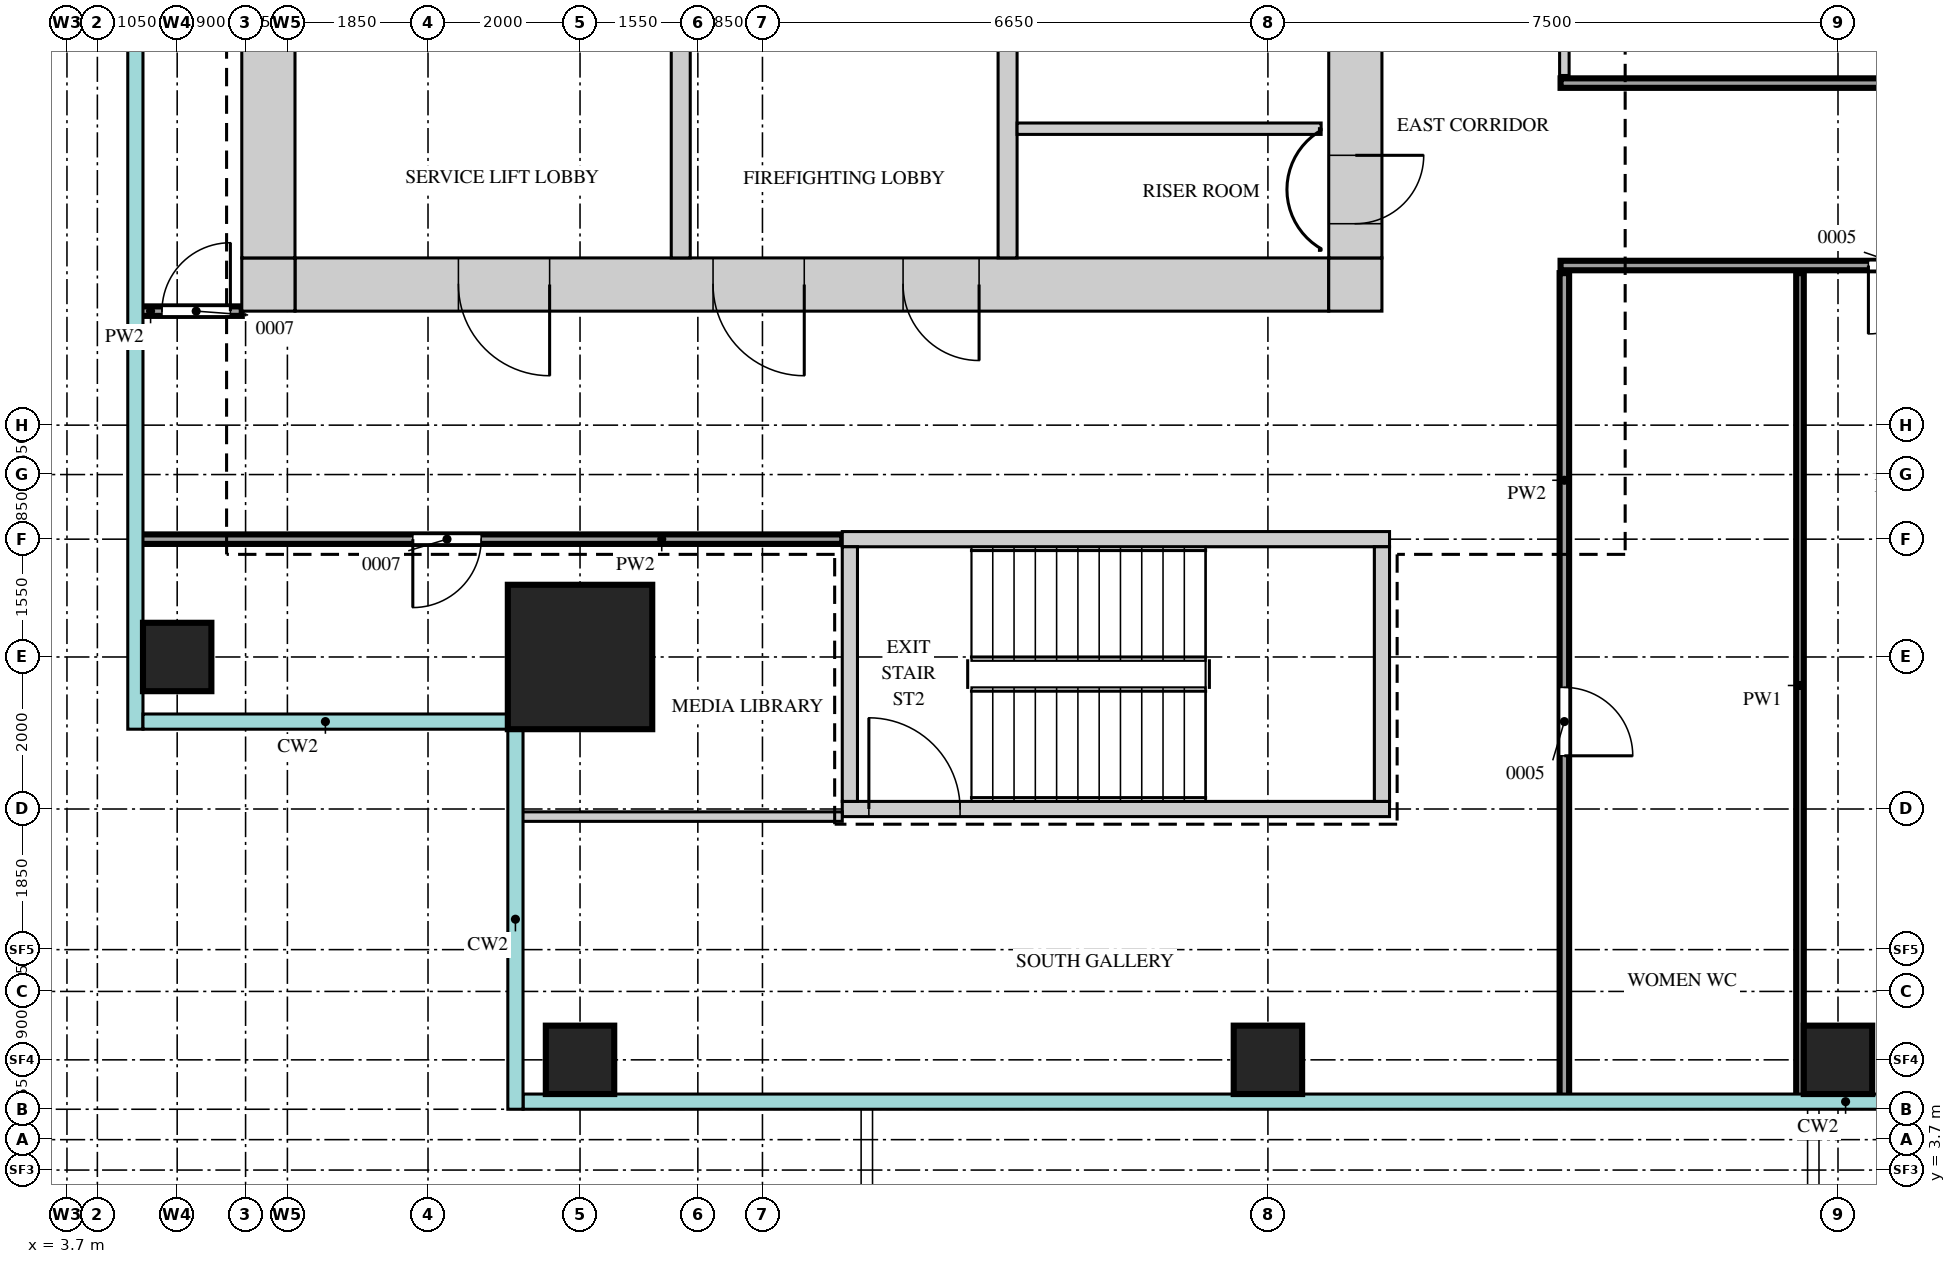
"""IFC4 building model, lengths in metres.
Left out: names, types, materials, properties, quantities, classifications, styles, units other than length and angle.
Written with IfcOpenShell. Run it as: python <this file> out.ifc"""

import sys

from ifc_helpers import new_model, si_unit, direction, frame, frame_2d, origin, origin_2d, place, context, subcontext, project, spatial, rectangle, extrude, source, transform, mapped, element, fill, save


model = new_model("IFC4")
c1 = context("Model", 3, precision=1e-05, world=origin(), true_north=direction((0.0, 1.0)))
c2 = subcontext(c1, "Body", "Model", "MODEL_VIEW")
j1 = project(units=[si_unit("LENGTHUNIT", "METRE"), si_unit("PLANEANGLEUNIT", "RADIAN")], contexts=[c1])
p1 = place(None, origin())
s1 = spatial("IfcSite", under=j1, at=p1, CompositionType="ELEMENT")
p2 = place(p1, origin())
s2 = spatial("IfcBuilding", under=s1, at=p2, CompositionType="ELEMENT")
p3 = place(p2, frame((0.0, 0.0, 254.2)))
s3 = spatial("IfcBuildingStorey", under=s2, at=p3, CompositionType="ELEMENT", Elevation=254.2)
m1 = source(origin(), c2, "Body", "SweptSolid", [
    extrude(rectangle(XDim=13.6, YDim=0.7, at=frame_2d((6.8, 0.0))), origin(), (0.0, 0.0, 1.0), 3.75),
])
p4 = place(p3, frame((6.7, 15.35, 0.0), z_axis=(0.0, 0.0, 1.0), x_axis=(1.0, 0.0, 0.0)))
e1 = element("IfcWall", 1, at=p4, inside=s3, PredefinedType="SHEAR", context=c2, shape_type="MappedRepresentation", body=[
    mapped(m1, transform((0.0, 0.0, 0.0))),
])
m2 = source(origin(), c2, "Body", "SweptSolid", [
    extrude(rectangle(XDim=1.2, YDim=2.1, at=frame_2d((0.6, 1.05))), frame((0.0, 0.36, 0.0), z_axis=(0.0, -1.0, 0.0), x_axis=(1.0, 0.0, 0.0)), (0.0, 0.0, 1.0), 0.72),
])
p5 = place(p4, frame((5.5, 0.0, 0.0)))
e2 = element("IfcOpeningElement", 2, at=p5, cuts=e1, PredefinedType="OPENING", context=c2, shape_type="MappedRepresentation", body=[
    mapped(m2, transform((0.0, 0.0, 0.0))),
])
p6 = place(p4, frame((2.15, 0.0, 0.0)))
e3 = element("IfcOpeningElement", 3, at=p6, cuts=e1, PredefinedType="OPENING", context=c2, shape_type="MappedRepresentation", body=[
    mapped(m2, transform((0.0, 0.0, 0.0))),
])
m3 = source(origin(), c2, "Body", "SweptSolid", [
    extrude(rectangle(XDim=1.0, YDim=2.1, at=frame_2d((0.5, 1.05))), frame((0.0, 0.36, 0.0), z_axis=(0.0, -1.0, 0.0), x_axis=(1.0, 0.0, 0.0)), (0.0, 0.0, 1.0), 0.72),
])
p7 = place(p4, frame((8.0, 0.0, 0.0)))
e4 = element("IfcOpeningElement", 4, at=p7, cuts=e1, PredefinedType="OPENING", context=c2, shape_type="MappedRepresentation", body=[
    mapped(m3, transform((0.0, 0.0, 0.0))),
])
m4 = source(origin(), c2, "Body", "SweptSolid", [
    extrude(rectangle(XDim=0.7, YDim=0.7, at=frame_2d((0.35, 0.0))), origin(), (0.0, 0.0, 1.0), 3.75),
])
for number, where, z_axis, x_axis in (
    (5, (20.3, 15.35, 0.0), (0.0, 0.0, 1.0), (1.0, 0.0, 0.0)),
    (6, (6.0, 15.35, 0.0), (0.0, 0.0, 1.0), (1.0, 0.0, 0.0)),
):
    element("IfcWall", number, at=place(p3, frame(where, z_axis=z_axis, x_axis=x_axis)), inside=s3, PredefinedType="SHEAR", context=c2, shape_type="MappedRepresentation", body=[
        mapped(m4, transform((0.0, 0.0, 0.0))),
    ])
m5 = source(origin(), c2, "Body", "SweptSolid", [
    extrude(rectangle(XDim=22.6, YDim=0.7, at=frame_2d((11.3, 0.0))), origin(), (0.0, 0.0, 1.0), 3.75),
])
p8 = place(p3, frame((20.65, 15.7, 0.0), z_axis=(0.0, 0.0, 1.0), x_axis=(0.0, 1.0, 0.0)))
e7 = element("IfcWall", 7, at=p8, inside=s3, PredefinedType="SHEAR", context=c2, shape_type="MappedRepresentation", body=[
    mapped(m5, transform((0.0, 0.0, 0.0))),
])
m6 = source(origin(), c2, "Body", "SweptSolid", [
    extrude(rectangle(XDim=1.8, YDim=2.1, at=frame_2d((0.9, 1.05))), frame((0.0, 0.36, 0.0), z_axis=(0.0, -1.0, 0.0), x_axis=(1.0, 0.0, 0.0)), (0.0, 0.0, 1.0), 0.72),
])
p9 = place(p8, frame((10.8, 0.0, 0.0)))
e8 = element("IfcOpeningElement", 8, at=p9, cuts=e7, PredefinedType="OPENING", context=c2, shape_type="MappedRepresentation", body=[
    mapped(m6, transform((0.0, 0.0, 0.0))),
])
m7 = source(origin(), c2, "Body", "SweptSolid", [
    extrude(rectangle(XDim=0.9, YDim=2.1, at=frame_2d((0.45, 1.05))), frame((0.0, 0.36, 0.0), z_axis=(0.0, -1.0, 0.0), x_axis=(1.0, 0.0, 0.0)), (0.0, 0.0, 1.0), 0.72),
])
p10 = place(p8, frame((0.45, 0.0, 0.0)))
e9 = element("IfcOpeningElement", 9, at=p10, cuts=e7, PredefinedType="OPENING", context=c2, shape_type="MappedRepresentation", body=[
    mapped(m7, transform((0.0, 0.0, 0.0))),
])
p11 = place(p8, frame((2.9, 0.0, 0.0)))
e10 = element("IfcOpeningElement", 10, at=p11, cuts=e7, PredefinedType="OPENING", context=c2, shape_type="MappedRepresentation", body=[
    mapped(m7, transform((0.0, 0.0, 0.0))),
])
p12 = place(p8, frame((5.65, 0.0, 0.0)))
e11 = element("IfcOpeningElement", 11, at=p12, cuts=e7, PredefinedType="OPENING", context=c2, shape_type="MappedRepresentation", body=[
    mapped(m7, transform((0.0, 0.0, 0.0))),
])
p13 = place(p3, frame((6.35, 15.7, 0.0), z_axis=(0.0, 0.0, 1.0), x_axis=(0.0, 1.0, 0.0)))
e12 = element("IfcWall", 12, at=p13, inside=s3, PredefinedType="SHEAR", context=c2, shape_type="MappedRepresentation", body=[
    mapped(m5, transform((0.0, 0.0, 0.0))),
])
m8 = source(origin(), c2, "Body", "SweptSolid", [
    extrude(rectangle(XDim=7.2, YDim=0.2, at=frame_2d((3.6, 0.0))), origin(), (0.0, 0.0, 1.0), 3.75),
])
p14 = place(p3, frame((13.9, 12.0, 0.0), z_axis=(0.0, 0.0, 1.0), x_axis=(1.0, 0.0, 0.0)))
e13 = element("IfcWall", 13, at=p14, inside=s3, PredefinedType="SHEAR", context=c2, shape_type="MappedRepresentation", body=[
    mapped(m8, transform((0.0, 0.0, 0.0))),
])
p15 = place(p3, frame((13.9, 8.45, 0.0), z_axis=(0.0, 0.0, 1.0), x_axis=(1.0, 0.0, 0.0)))
e14 = element("IfcWall", 14, at=p15, inside=s3, PredefinedType="SHEAR", context=c2, shape_type="MappedRepresentation", body=[
    mapped(m8, transform((0.0, 0.0, 0.0))),
])
m9 = source(origin(), c2, "Body", "SweptSolid", [
    extrude(rectangle(XDim=1.2, YDim=2.1, at=frame_2d((0.6, 1.05))), frame((0.0, 0.11, 0.0), z_axis=(0.0, -1.0, 0.0), x_axis=(1.0, 0.0, 0.0)), (0.0, 0.0, 1.0), 0.22),
])
p16 = place(p15, frame((0.35, 0.0, 0.0)))
e15 = element("IfcOpeningElement", 15, at=p16, cuts=e14, PredefinedType="OPENING", context=c2, shape_type="MappedRepresentation", body=[
    mapped(m9, transform((0.0, 0.0, 0.0))),
])
m10 = source(origin(), c2, "Body", "SweptSolid", [
    extrude(rectangle(XDim=3.35, YDim=0.2, at=frame_2d((1.675, 0.0))), origin(), (0.0, 0.0, 1.0), 3.75),
])
for number, where, z_axis, x_axis in (
    (16, (21.0, 8.55, 0.0), (0.0, 0.0, 1.0), (0.0, 1.0, 0.0)),
    (17, (14.0, 8.55, 0.0), (0.0, 0.0, 1.0), (0.0, 1.0, 0.0)),
):
    element("IfcWall", number, at=place(p3, frame(where, z_axis=z_axis, x_axis=x_axis)), inside=s3, PredefinedType="SHEAR", context=c2, shape_type="MappedRepresentation", body=[
        mapped(m10, transform((0.0, 0.0, 0.0))),
    ])
m11 = source(origin(), c2, "Body", "SweptSolid", [
    extrude(rectangle(XDim=3.5, YDim=0.25, at=frame_2d((1.75, 0.0))), origin(), (0.0, 0.0, 1.0), 3.75),
])
for number, where, z_axis, x_axis in (
    (18, (16.075, 15.7, 0.0), (0.0, 0.0, 1.0), (0.0, 1.0, 0.0)),
    (19, (11.775, 15.7, 0.0), (0.0, 0.0, 1.0), (0.0, 1.0, 0.0)),
):
    element("IfcWall", number, at=place(p3, frame(where, z_axis=z_axis, x_axis=x_axis)), inside=s3, PredefinedType="STANDARD", context=c2, shape_type="MappedRepresentation", body=[
        mapped(m11, transform((0.0, 0.0, 0.0))),
    ])
m12 = source(origin(), c2, "Body", "SweptSolid", [
    extrude(rectangle(XDim=1.9, YDim=1.9, at=origin_2d()), origin(), (0.0, 0.0, 1.0), 4.0),
])
p17 = place(p3, frame((10.45, 10.45, 0.0), z_axis=(0.0, 0.0, 1.0), x_axis=(1.0, 0.0, 0.0)))
e20 = element("IfcColumn", 20, at=p17, inside=s3, PredefinedType="COLUMN", context=c2, shape_type="MappedRepresentation", body=[
    mapped(m12, transform((0.0, 0.0, 0.0))),
])
m13 = source(origin(), c2, "Body", "SweptSolid", [
    extrude(rectangle(XDim=0.9, YDim=0.9, at=origin_2d()), origin(), (0.0, 0.0, 1.0), 3.75),
])
for number, where, z_axis, x_axis in (
    (21, (10.45, 5.15, 0.0), (0.0, 0.0, 1.0), (1.0, 0.0, 0.0)),
    (22, (19.5, 5.15, 0.0), (0.0, 0.0, 1.0), (1.0, 0.0, 0.0)),
    (23, (27.0, 5.15, 0.0), (0.0, 0.0, 1.0), (1.0, 0.0, 0.0)),
    (24, (5.15, 10.45, 0.0), (0.0, 0.0, 1.0), (1.0, 0.0, 0.0)),
):
    element("IfcColumn", number, at=place(p3, frame(where, z_axis=z_axis, x_axis=x_axis)), inside=s3, PredefinedType="COLUMN", context=c2, shape_type="MappedRepresentation", body=[
        mapped(m13, transform((0.0, 0.0, 0.0))),
    ])
m14 = source(origin(), c2, "Body", "SweptSolid", [
    extrude(rectangle(XDim=10.85, YDim=0.125, at=frame_2d((5.425, 0.0))), origin(), (0.0, 0.0, 1.0), 3.8),
])
p18 = place(p3, frame((23.4, 4.65, 0.0), z_axis=(0.0, 0.0, 1.0), x_axis=(0.0, 1.0, 0.0)))
e25 = element("IfcWall", 25, at=p18, inside=s3, PredefinedType="PARTITIONING", context=c2, shape_type="MappedRepresentation", body=[
    mapped(m14, transform((0.0, 0.0, 0.0))),
])
m15 = source(origin(), c2, "Body", "SweptSolid", [
    extrude(rectangle(XDim=0.9, YDim=2.1, at=frame_2d((0.45, 1.05))), frame((0.0, 0.073, 0.0), z_axis=(0.0, -1.0, 0.0), x_axis=(1.0, 0.0, 0.0)), (0.0, 0.0, 1.0), 0.145),
])
p19 = place(p18, frame((4.5, 0.0, 0.0)))
e26 = element("IfcOpeningElement", 26, at=p19, cuts=e25, PredefinedType="OPENING", context=c2, shape_type="MappedRepresentation", body=[
    mapped(m15, transform((0.0, 0.0, 0.0))),
])
m16 = source(origin(), c2, "Body", "SweptSolid", [
    extrude(rectangle(XDim=10.85, YDim=0.1, at=frame_2d((5.425, 0.0))), origin(), (0.0, 0.0, 1.0), 3.8),
])
p20 = place(p3, frame((26.5, 4.65, 0.0), z_axis=(0.0, 0.0, 1.0), x_axis=(0.0, 1.0, 0.0)))
e27 = element("IfcWall", 27, at=p20, inside=s3, PredefinedType="PARTITIONING", context=c2, shape_type="MappedRepresentation", body=[
    mapped(m16, transform((0.0, 0.0, 0.0))),
])
m17 = source(origin(), c2, "Body", "SweptSolid", [
    extrude(rectangle(XDim=4.25, YDim=0.125, at=frame_2d((2.125, 0.0))), origin(), (0.0, 0.0, 1.0), 3.8),
])
p21 = place(p3, frame((9.65, 8.35, 0.0), z_axis=(0.0, 0.0, 1.0), x_axis=(1.0, 0.0, 0.0)))
e28 = element("IfcWall", 28, at=p21, inside=s3, PredefinedType="PARTITIONING", context=c2, shape_type="MappedRepresentation", body=[
    mapped(m17, transform((0.0, 0.0, 0.0))),
])
m18 = source(origin(), c2, "Body", "SweptSolid", [
    extrude(rectangle(XDim=9.25, YDim=0.125, at=frame_2d((4.625, 0.0))), origin(), (0.0, 0.0, 1.0), 3.8),
])
p22 = place(p3, frame((4.65, 12.0, 0.0), z_axis=(0.0, 0.0, 1.0), x_axis=(1.0, 0.0, 0.0)))
e29 = element("IfcWall", 29, at=p22, inside=s3, PredefinedType="PARTITIONING", context=c2, shape_type="MappedRepresentation", body=[
    mapped(m18, transform((0.0, 0.0, 0.0))),
])
p23 = place(p22, frame((3.6, 0.0, 0.0)))
e30 = element("IfcOpeningElement", 30, at=p23, cuts=e29, PredefinedType="OPENING", context=c2, shape_type="MappedRepresentation", body=[
    mapped(m15, transform((0.0, 0.0, 0.0))),
])
m19 = source(origin(), c2, "Body", "SweptSolid", [
    extrude(rectangle(XDim=1.35, YDim=0.125, at=frame_2d((0.675, 0.0))), origin(), (0.0, 0.0, 1.0), 3.8),
])
p24 = place(p3, frame((4.65, 15.0, 0.0), z_axis=(0.0, 0.0, 1.0), x_axis=(1.0, 0.0, 0.0)))
e31 = element("IfcWall", 31, at=p24, inside=s3, PredefinedType="PARTITIONING", context=c2, shape_type="MappedRepresentation", body=[
    mapped(m19, transform((0.0, 0.0, 0.0))),
])
p25 = place(p24, frame((0.3, 0.0, 0.0)))
e32 = element("IfcOpeningElement", 32, at=p25, cuts=e31, PredefinedType="OPENING", context=c2, shape_type="MappedRepresentation", body=[
    mapped(m15, transform((0.0, 0.0, 0.0))),
])
m20 = source(origin(), c2, "Body", "SweptSolid", [
    extrude(rectangle(XDim=26.0, YDim=0.125, at=frame_2d((13.0, 0.0))), origin(), (0.0, 0.0, 1.0), 3.8),
])
p26 = place(p3, frame((23.35, 15.6, 0.0), z_axis=(0.0, 0.0, 1.0), x_axis=(1.0, 0.0, 0.0)))
e33 = element("IfcWall", 33, at=p26, inside=s3, PredefinedType="PARTITIONING", context=c2, shape_type="MappedRepresentation", body=[
    mapped(m20, transform((0.0, 0.0, 0.0))),
])
p27 = place(p26, frame((4.05, 0.0, 0.0)))
e34 = element("IfcOpeningElement", 34, at=p27, cuts=e33, PredefinedType="OPENING", context=c2, shape_type="MappedRepresentation", body=[
    mapped(m15, transform((0.0, 0.0, 0.0))),
])
m21 = source(origin(), c2, "Body", "SweptSolid", [
    extrude(rectangle(XDim=1.0, YDim=2.1, at=frame_2d((0.5, 1.05))), frame((0.0, 0.073, 0.0), z_axis=(0.0, -1.0, 0.0), x_axis=(1.0, 0.0, 0.0)), (0.0, 0.0, 1.0), 0.145),
])
p28 = place(p26, frame((6.85, 0.0, 0.0)))
e35 = element("IfcOpeningElement", 35, at=p28, cuts=e33, PredefinedType="OPENING", context=c2, shape_type="MappedRepresentation", body=[
    mapped(m21, transform((0.0, 0.0, 0.0))),
])
p29 = place(p26, frame((9.25, 0.0, 0.0)))
e36 = element("IfcOpeningElement", 36, at=p29, cuts=e33, PredefinedType="OPENING", context=c2, shape_type="MappedRepresentation", body=[
    mapped(m15, transform((0.0, 0.0, 0.0))),
])
m22 = source(origin(), c2, "Body", "SweptSolid", [
    extrude(rectangle(XDim=1.2, YDim=2.1, at=frame_2d((0.6, 1.05))), frame((0.0, 0.073, 0.0), z_axis=(0.0, -1.0, 0.0), x_axis=(1.0, 0.0, 0.0)), (0.0, 0.0, 1.0), 0.145),
])
p30 = place(p26, frame((18.05, 0.0, 0.0)))
e37 = element("IfcOpeningElement", 37, at=p30, cuts=e33, PredefinedType="OPENING", context=c2, shape_type="MappedRepresentation", body=[
    mapped(m22, transform((0.0, 0.0, 0.0))),
])
m23 = source(origin(), c2, "Body", "SweptSolid", [
    extrude(rectangle(XDim=4.0, YDim=0.15, at=frame_2d((2.0, 0.0))), origin(), (0.0, 0.0, 1.0), 3.8),
])
p31 = place(p3, frame((16.2, 17.4, 0.0), z_axis=(0.0, 0.0, 1.0), x_axis=(1.0, 0.0, 0.0)))
e38 = element("IfcWall", 38, at=p31, inside=s3, PredefinedType="PARTITIONING", context=c2, shape_type="MappedRepresentation", body=[
    mapped(m23, transform((0.0, 0.0, 0.0))),
])
p32 = place(p3, frame((23.35, 18.0, 0.0), z_axis=(0.0, 0.0, 1.0), x_axis=(1.0, 0.0, 0.0)))
e39 = element("IfcWall", 39, at=p32, inside=s3, PredefinedType="PARTITIONING", context=c2, shape_type="MappedRepresentation", body=[
    mapped(m20, transform((0.0, 0.0, 0.0))),
])
p33 = place(p32, frame((12.5, 0.0, 0.0)))
e40 = element("IfcOpeningElement", 40, at=p33, cuts=e39, PredefinedType="OPENING", context=c2, shape_type="MappedRepresentation", body=[
    mapped(m22, transform((0.0, 0.0, 0.0))),
])
m24 = source(origin(), c2, "Body", "SweptSolid", [
    extrude(rectangle(XDim=20.8, YDim=0.125, at=frame_2d((10.4, 0.0))), origin(), (0.0, 0.0, 1.0), 3.8),
])
p34 = place(p3, frame((23.4, 18.1, 0.0), z_axis=(0.0, 0.0, 1.0), x_axis=(0.0, 1.0, 0.0)))
e41 = element("IfcWall", 41, at=p34, inside=s3, PredefinedType="PARTITIONING", context=c2, shape_type="MappedRepresentation", body=[
    mapped(m24, transform((0.0, 0.0, 0.0))),
])
p35 = place(p34, frame((12.05, 0.0, 0.0)))
e42 = element("IfcOpeningElement", 42, at=p35, cuts=e41, PredefinedType="OPENING", context=c2, shape_type="MappedRepresentation", body=[
    mapped(m22, transform((0.0, 0.0, 0.0))),
])
m25 = source(origin(), c2, "Body", "SweptSolid", [
    extrude(rectangle(XDim=0.9, YDim=2.1, at=frame_2d((0.45, 1.05))), frame((0.0, 0.3, 0.0), z_axis=(0.0, -1.0, 0.0), x_axis=(1.0, 0.0, 0.0)), (0.0, 0.0, 1.0), 0.6),
])
p36 = place(p10, origin())
e43 = element("IfcDoor", 43, at=p36, inside=s3, OperationType="SINGLE_SWING_RIGHT", PredefinedType="DOOR", context=c2, shape_type="MappedRepresentation", body=[
    mapped(m25, transform((0.0, 0.0, 0.0))),
])
fill(e9, e43)
m26 = source(origin(), c2, "Body", "SweptSolid", [
    extrude(rectangle(XDim=1.2, YDim=2.1, at=frame_2d((0.6, 1.05))), frame((0.0, 0.3, 0.0), z_axis=(0.0, -1.0, 0.0), x_axis=(1.0, 0.0, 0.0)), (0.0, 0.0, 1.0), 0.6),
])
p37 = place(p5, origin())
e44 = element("IfcDoor", 44, at=p37, inside=s3, OperationType="SINGLE_SWING_RIGHT", PredefinedType="DOOR", context=c2, shape_type="MappedRepresentation", body=[
    mapped(m26, transform((0.0, 0.0, 0.0))),
])
fill(e2, e44)
p38 = place(p6, origin())
e45 = element("IfcDoor", 45, at=p38, inside=s3, OperationType="SINGLE_SWING_RIGHT", PredefinedType="DOOR", context=c2, shape_type="MappedRepresentation", body=[
    mapped(m26, transform((0.0, 0.0, 0.0))),
])
fill(e3, e45)
m27 = source(origin(), c2, "Body", "SweptSolid", [
    extrude(rectangle(XDim=1.0, YDim=2.1, at=frame_2d((0.5, 1.05))), frame((0.0, 0.3, 0.0), z_axis=(0.0, -1.0, 0.0), x_axis=(1.0, 0.0, 0.0)), (0.0, 0.0, 1.0), 0.6),
])
p39 = place(p7, origin())
e46 = element("IfcDoor", 46, at=p39, inside=s3, OperationType="SINGLE_SWING_RIGHT", PredefinedType="DOOR", context=c2, shape_type="MappedRepresentation", body=[
    mapped(m27, transform((0.0, 0.0, 0.0))),
])
fill(e4, e46)
m28 = source(origin(), c2, "Body", "SweptSolid", [
    extrude(rectangle(XDim=0.9, YDim=2.1, at=frame_2d((0.45, 1.05))), frame((0.0, 0.025, 0.0), z_axis=(0.0, -1.0, 0.0), x_axis=(1.0, 0.0, 0.0)), (0.0, 0.0, 1.0), 0.05),
])
p40 = place(p25, origin())
e47 = element("IfcDoor", 47, at=p40, inside=s3, OperationType="SINGLE_SWING_LEFT", PredefinedType="DOOR", context=c2, shape_type="MappedRepresentation", body=[
    mapped(m28, transform((0.0, 0.0, 0.0))),
])
fill(e32, e47)
p41 = place(p23, origin())
e48 = element("IfcDoor", 48, at=p41, inside=s3, OperationType="SINGLE_SWING_LEFT", PredefinedType="DOOR", context=c2, shape_type="MappedRepresentation", body=[
    mapped(m28, transform((0.0, 0.0, 0.0))),
])
fill(e30, e48)
p42 = place(p19, origin())
e49 = element("IfcDoor", 49, at=p42, inside=s3, OperationType="SINGLE_SWING_LEFT", PredefinedType="DOOR", context=c2, shape_type="MappedRepresentation", body=[
    mapped(m28, transform((0.0, 0.0, 0.0))),
])
fill(e26, e49)
p43 = place(p27, origin())
e50 = element("IfcDoor", 50, at=p43, inside=s3, OperationType="SINGLE_SWING_LEFT", PredefinedType="DOOR", context=c2, shape_type="MappedRepresentation", body=[
    mapped(m28, transform((0.0, 0.0, 0.0))),
])
fill(e34, e50)
m29 = source(origin(), c2, "Body", "SweptSolid", [
    extrude(rectangle(XDim=1.2, YDim=2.1, at=frame_2d((0.6, 1.05))), frame((0.0, 0.025, 0.0), z_axis=(0.0, -1.0, 0.0), x_axis=(1.0, 0.0, 0.0)), (0.0, 0.0, 1.0), 0.05),
])
p44 = place(p16, origin())
e51 = element("IfcDoor", 51, at=p44, inside=s3, OperationType="SINGLE_SWING_RIGHT", PredefinedType="DOOR", context=c2, shape_type="MappedRepresentation", body=[
    mapped(m29, transform((0.0, 0.0, 0.0))),
])
fill(e15, e51)
save(model, sys.argv[1])
